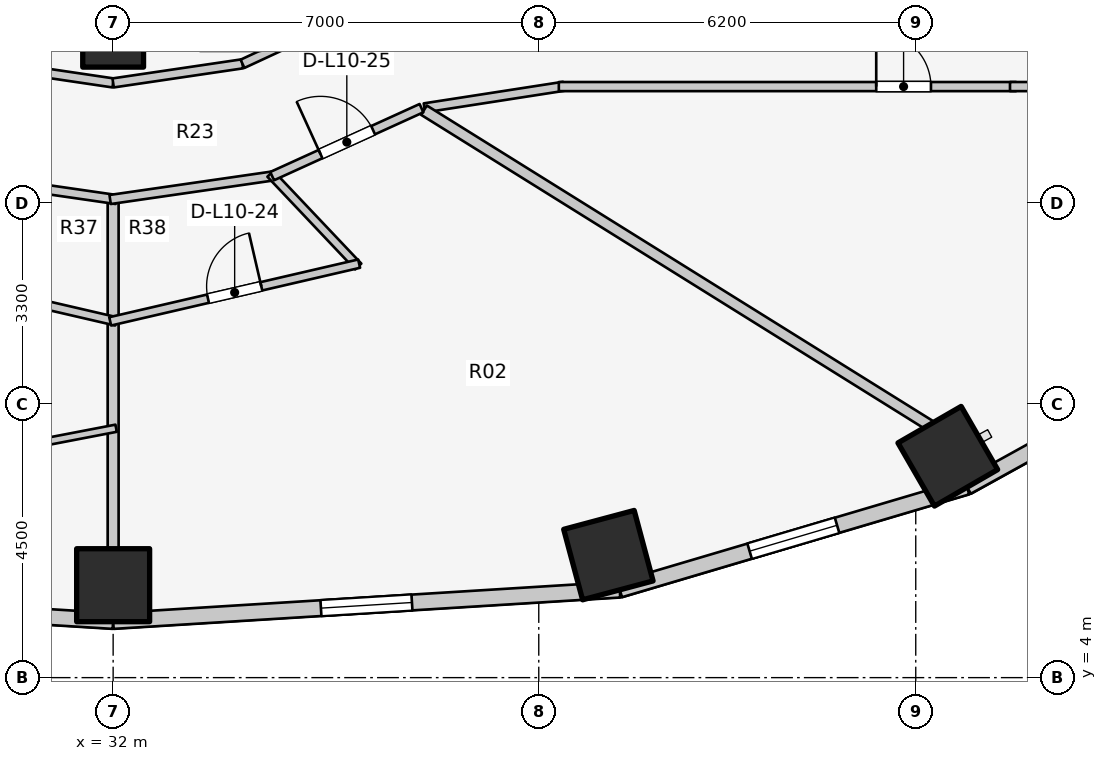
"""IFC4 building model, lengths in metres.
Left out: names, types, materials, properties, quantities, classifications, styles, units other than length and angle.
Written with IfcOpenShell. Run it as: python <this file> out.ifc"""

import sys

from ifc_helpers import new_model, si_unit, direction, frame, frame_2d, origin, origin_2d, place, context, subcontext, project, spatial, rectangle, extrude, element, fill, save


model = new_model("IFC4")
c1 = context("Model", 3, precision=1e-05, world=origin(), true_north=direction((0.0, 1.0)))
c2 = subcontext(c1, "Body", "Model", "MODEL_VIEW")
j1 = project(units=[si_unit("LENGTHUNIT", "METRE"), si_unit("PLANEANGLEUNIT", "RADIAN")], contexts=[c1])
p1 = place(None, origin())
s1 = spatial("IfcSite", under=j1, at=p1, CompositionType="ELEMENT")
p2 = place(p1, origin())
s2 = spatial("IfcBuilding", under=s1, at=p2, CompositionType="ELEMENT")
p3 = place(p2, frame((0.0, 0.0, 36.9)))
s3 = spatial("IfcBuildingStorey", under=s2, at=p3, CompositionType="ELEMENT", Elevation=36.9)
p4 = place(p3, frame((32.0, 14.54, 0.0), z_axis=(0.0, 0.0, 1.0), x_axis=(1.0, 0.0, 0.0)))
e1 = element("IfcColumn", 1, at=p4, inside=s3, PredefinedType="COLUMN", context=c2, shape_type="SweptSolid", body=[
    extrude(rectangle(XDim=1.0, YDim=1.0, at=origin_2d()), origin(), (0.0, 0.0, 1.0), 3.1),
])
for number, where, z_axis, x_axis in (
    (2, (32.0, 5.52, 0.0), (0.0, 0.0, 1.0), (0.0, -1.0, 0.0)),
    (3, (40.145, 6.014, 0.0), (0.0, 0.0, 1.0), (0.259, -0.966, 0.0)),
    (4, (45.727, 7.641, 0.0), (0.0, 0.0, 1.0), (0.5, -0.866, 0.0)),
):
    element("IfcColumn", number, at=place(p3, frame(where, z_axis=z_axis, x_axis=x_axis)), inside=s3, PredefinedType="COLUMN", context=c2, shape_type="SweptSolid", body=[
        extrude(rectangle(XDim=1.2, YDim=1.2, at=origin_2d()), origin(), (0.0, 0.0, 1.0), 3.1),
    ])
p5 = place(p3, frame((23.668, 5.447, 0.0), z_axis=(0.0, 0.0, 1.0), x_axis=(0.998090514779, -0.061768311519, 0.0)))
e5 = element("IfcWall", 5, at=p5, inside=s3, PredefinedType="STANDARD", context=c2, shape_type="SweptSolid", body=[
    extrude(rectangle(XDim=8.348, YDim=0.26, at=frame_2d((4.174, 0.0))), origin(), (0.0, 0.0, 1.0), 2.85),
])
p6 = place(p5, frame((2.974, 0.0, 0.75)))
e6 = element("IfcOpeningElement", 6, at=p6, cuts=e5, PredefinedType="OPENING", context=c2, shape_type="SweptSolid", body=[
    extrude(rectangle(XDim=2.4, YDim=1.7, at=frame_2d((1.2, 0.85))), frame((0.0, 0.14, 0.0), z_axis=(0.0, -1.0, 0.0), x_axis=(1.0, 0.0, 0.0)), (0.0, 0.0, 1.0), 0.28),
])
p7 = place(p3, frame((32.0, 4.931, 0.0), z_axis=(0.0, 0.0, 1.0), x_axis=(0.998090514779, 0.061768311519, 0.0)))
e7 = element("IfcWall", 7, at=p7, inside=s3, PredefinedType="STANDARD", context=c2, shape_type="SweptSolid", body=[
    extrude(rectangle(XDim=8.348, YDim=0.26, at=frame_2d((4.174, 0.0))), origin(), (0.0, 0.0, 1.0), 2.85),
])
p8 = place(p7, frame((3.424, 0.0, 0.75)))
e8 = element("IfcOpeningElement", 8, at=p8, cuts=e7, PredefinedType="OPENING", context=c2, shape_type="SweptSolid", body=[
    extrude(rectangle(XDim=1.5, YDim=1.6, at=frame_2d((0.75, 0.8))), frame((0.0, 0.14, 0.0), z_axis=(0.0, -1.0, 0.0), x_axis=(1.0, 0.0, 0.0)), (0.0, 0.0, 1.0), 0.28),
])
p9 = place(p3, frame((40.332, 5.447, 0.0), z_axis=(0.0, 0.0, 1.0), x_axis=(0.958843593522, 0.283934786811, 0.0)))
e9 = element("IfcWall", 9, at=p9, inside=s3, PredefinedType="STANDARD", context=c2, shape_type="SweptSolid", body=[
    extrude(rectangle(XDim=5.955, YDim=0.26, at=frame_2d((2.978, 0.0))), origin(), (0.0, 0.0, 1.0), 2.85),
])
p10 = place(p9, frame((2.228, 0.0, 0.75)))
e10 = element("IfcOpeningElement", 10, at=p10, cuts=e9, PredefinedType="OPENING", context=c2, shape_type="SweptSolid", body=[
    extrude(rectangle(XDim=1.5, YDim=1.6, at=frame_2d((0.75, 0.8))), frame((0.0, 0.14, 0.0), z_axis=(0.0, -1.0, 0.0), x_axis=(1.0, 0.0, 0.0)), (0.0, 0.0, 1.0), 0.28),
])
p11 = place(p3, frame((46.042, 7.138, 0.0), z_axis=(0.0, 0.0, 1.0), x_axis=(0.875137303239, 0.483874674352, 0.0)))
e11 = element("IfcWall", 11, at=p11, inside=s3, PredefinedType="STANDARD", context=c2, shape_type="SweptSolid", body=[
    extrude(rectangle(XDim=4.985, YDim=0.26, at=frame_2d((2.493, 0.0))), origin(), (0.0, 0.0, 1.0), 2.85),
])
for number, where, z_axis, x_axis in (
    (12, (29.873, 14.094, 0.0), (0.0, 0.0, 1.0), (0.989, -0.146, 0.0)),
    (13, (32.0, 13.78, 0.0), (0.0, 0.0, 1.0), (0.989, 0.146, 0.0)),
):
    element("IfcWall", number, at=place(p3, frame(where, z_axis=z_axis, x_axis=x_axis)), inside=s3, PredefinedType="PARTITIONING", context=c2, shape_type="SweptSolid", body=[
        extrude(rectangle(XDim=2.151, YDim=0.15, at=frame_2d((1.075, 0.0))), origin(), (0.0, 0.0, 1.0), 2.237),
    ])
p12 = place(p3, frame((34.127, 14.094, 0.0), z_axis=(0.0, 0.0, 1.0), x_axis=(0.906943449489, 0.421252393975, 0.0)))
e14 = element("IfcWall", 14, at=p12, inside=s3, PredefinedType="PARTITIONING", context=c2, shape_type="SweptSolid", body=[
    extrude(rectangle(XDim=2.186, YDim=0.15, at=frame_2d((1.093, 0.0))), origin(), (0.0, 0.0, 1.0), 2.237),
])
p13 = place(p3, frame((37.119, 13.369, 0.0), z_axis=(0.0, 0.0, 1.0), x_axis=(0.988184633586, 0.153268163508, 0.0)))
e15 = element("IfcWall", 15, at=p13, inside=s3, PredefinedType="PARTITIONING", context=c2, shape_type="SweptSolid", body=[
    extrude(rectangle(XDim=2.318, YDim=0.15, at=frame_2d((1.159, 0.0))), origin(), (0.0, 0.0, 1.0), 2.237),
])
p14 = place(p3, frame((39.33, 13.72, 0.0), z_axis=(0.0, 0.0, 1.0), x_axis=(1.0, 0.0, 0.0)))
e16 = element("IfcWall", 16, at=p14, inside=s3, PredefinedType="PARTITIONING", context=c2, shape_type="SweptSolid", body=[
    extrude(rectangle(XDim=7.52, YDim=0.15, at=frame_2d((3.76, 0.0))), origin(), (0.0, 0.0, 1.0), 2.237),
])
p15 = place(p14, frame((5.22, 0.0, 0.0)))
e17 = element("IfcOpeningElement", 17, at=p15, cuts=e16, PredefinedType="OPENING", context=c2, shape_type="SweptSolid", body=[
    extrude(rectangle(XDim=0.9, YDim=2.1, at=frame_2d((0.45, 1.05))), frame((0.0, 0.085, 0.0), z_axis=(0.0, -1.0, 0.0), x_axis=(1.0, 0.0, 0.0)), (0.0, 0.0, 1.0), 0.17),
])
p16 = place(p3, frame((46.75, 13.72, 0.0), z_axis=(0.0, 0.0, 1.0), x_axis=(1.0, 0.0, 0.0)))
e18 = element("IfcWall", 18, at=p16, inside=s3, PredefinedType="PARTITIONING", context=c2, shape_type="SweptSolid", body=[
    extrude(rectangle(XDim=5.05, YDim=0.15, at=frame_2d((2.525, 0.0))), origin(), (0.0, 0.0, 1.0), 2.069),
])
p17 = place(p3, frame((32.0, 11.815, 0.0), z_axis=(0.0, 0.0, 1.0), x_axis=(0.0, -1.0, 0.0)))
e19 = element("IfcWall", 19, at=p17, inside=s3, PredefinedType="PARTITIONING", context=c2, shape_type="SweptSolid", body=[
    extrude(rectangle(XDim=5.715, YDim=0.18, at=frame_2d((2.857, 0.0))), origin(), (0.0, 0.0, 1.0), 2.237),
])
p18 = place(p3, frame((37.112, 13.332, 0.0), z_axis=(0.0, 0.0, 1.0), x_axis=(0.848647785721, -0.52895834977, 0.0)))
e20 = element("IfcWall", 20, at=p18, inside=s3, PredefinedType="PARTITIONING", context=c2, shape_type="SweptSolid", body=[
    extrude(rectangle(XDim=9.81, YDim=0.18, at=frame_2d((4.905, 0.0))), origin(), (0.0, 0.0, 1.0), 2.237),
])
p19 = place(p3, frame((26.932, 7.118, 0.0), z_axis=(0.0, 0.0, 1.0), x_axis=(0.982039182538, 0.188677089126, 0.0)))
e21 = element("IfcWall", 21, at=p19, inside=s3, PredefinedType="MOVABLE", context=c2, shape_type="SweptSolid", body=[
    extrude(rectangle(XDim=5.211, YDim=0.12, at=frame_2d((2.605, 0.0))), origin(), (0.0, 0.0, 1.0), 2.237),
])
p20 = place(p19, frame((2.131, 0.0, 0.0)))
e22 = element("IfcOpeningElement", 22, at=p20, cuts=e21, PredefinedType="OPENING", context=c2, shape_type="SweptSolid", body=[
    extrude(rectangle(XDim=0.95, YDim=2.1, at=frame_2d((0.475, 1.05))), frame((0.0, 0.07, 0.0), z_axis=(0.0, -1.0, 0.0), x_axis=(1.0, 0.0, 0.0)), (0.0, 0.0, 1.0), 0.14),
])
p21 = place(p3, frame((29.329, 12.256, 0.0), z_axis=(0.0, 0.0, 1.0), x_axis=(0.989701115085, -0.143149232617, 0.0)))
e23 = element("IfcWall", 23, at=p21, inside=s3, PredefinedType="PARTITIONING", context=c2, shape_type="SweptSolid", body=[
    extrude(rectangle(XDim=2.749, YDim=0.15, at=frame_2d((1.375, 0.0))), origin(), (0.0, 0.0, 1.0), 2.237),
])
p22 = place(p3, frame((27.954, 10.808, 0.0), z_axis=(0.0, 0.0, 1.0), x_axis=(0.974148813221, -0.225907259071, 0.0)))
e24 = element("IfcWall", 24, at=p22, inside=s3, PredefinedType="PLUMBINGWALL", context=c2, shape_type="SweptSolid", body=[
    extrude(rectangle(XDim=4.203, YDim=0.14, at=frame_2d((2.102, 0.0))), origin(), (0.0, 0.0, 1.0), 2.237),
])
p23 = place(p22, frame((1.652, 0.0, 0.0)))
e25 = element("IfcOpeningElement", 25, at=p23, cuts=e24, PredefinedType="OPENING", context=c2, shape_type="SweptSolid", body=[
    extrude(rectangle(XDim=0.9, YDim=2.1, at=frame_2d((0.45, 1.05))), frame((0.0, 0.08, 0.0), z_axis=(0.0, -1.0, 0.0), x_axis=(1.0, 0.0, 0.0)), (0.0, 0.0, 1.0), 0.16),
])
p24 = place(p3, frame((31.95, 11.863, 0.0), z_axis=(0.0, 0.0, 1.0), x_axis=(0.989701115085, 0.143149232617, 0.0)))
e26 = element("IfcWall", 26, at=p24, inside=s3, PredefinedType="PARTITIONING", context=c2, shape_type="SweptSolid", body=[
    extrude(rectangle(XDim=2.749, YDim=0.15, at=frame_2d((1.375, 0.0))), origin(), (0.0, 0.0, 1.0), 2.237),
])
p25 = place(p3, frame((34.587, 12.285, 0.0), z_axis=(0.0, 0.0, 1.0), x_axis=(0.687544693502, -0.72614206216, 0.0)))
e27 = element("IfcWall", 27, at=p25, inside=s3, PredefinedType="PLUMBINGWALL", context=c2, shape_type="SweptSolid", body=[
    extrude(rectangle(XDim=2.1, YDim=0.14, at=frame_2d((1.05, 0.0))), origin(), (0.0, 0.0, 1.0), 2.855),
])
p26 = place(p3, frame((31.951, 9.859, 0.0), z_axis=(0.0, 0.0, 1.0), x_axis=(0.974148813221, 0.225907259071, 0.0)))
e28 = element("IfcWall", 28, at=p26, inside=s3, PredefinedType="PLUMBINGWALL", context=c2, shape_type="SweptSolid", body=[
    extrude(rectangle(XDim=4.203, YDim=0.14, at=frame_2d((2.102, 0.0))), origin(), (0.0, 0.0, 1.0), 2.237),
])
p27 = place(p26, frame((1.652, 0.0, 0.0)))
e29 = element("IfcOpeningElement", 29, at=p27, cuts=e28, PredefinedType="OPENING", context=c2, shape_type="SweptSolid", body=[
    extrude(rectangle(XDim=0.9, YDim=2.1, at=frame_2d((0.45, 1.05))), frame((0.0, 0.08, 0.0), z_axis=(0.0, -1.0, 0.0), x_axis=(1.0, 0.0, 0.0)), (0.0, 0.0, 1.0), 0.16),
])
p28 = place(p3, frame((34.615, 12.247, 0.0), z_axis=(0.0, 0.0, 1.0), x_axis=(0.910186679378, 0.414198272186, 0.0)))
e30 = element("IfcWall", 30, at=p28, inside=s3, PredefinedType="PARTITIONING", context=c2, shape_type="SweptSolid", body=[
    extrude(rectangle(XDim=2.698, YDim=0.15, at=frame_2d((1.349, 0.0))), origin(), (0.0, 0.0, 1.0), 2.237),
])
p29 = place(p28, frame((0.874, 0.0, 0.0)))
e31 = element("IfcOpeningElement", 31, at=p29, cuts=e30, PredefinedType="OPENING", context=c2, shape_type="SweptSolid", body=[
    extrude(rectangle(XDim=0.95, YDim=2.1, at=frame_2d((0.475, 1.05))), frame((0.0, 0.085, 0.0), z_axis=(0.0, -1.0, 0.0), x_axis=(1.0, 0.0, 0.0)), (0.0, 0.0, 1.0), 0.17),
])
p30 = place(p8, origin())
e32 = element("IfcWindow", 32, at=p30, inside=s3, PartitioningType="SINGLE_PANEL", PredefinedType="WINDOW", context=c2, shape_type="SweptSolid", body=[
    extrude(rectangle(XDim=1.5, YDim=1.6, at=frame_2d((0.75, 0.8))), frame((0.0, 0.03, 0.0), z_axis=(0.0, -1.0, 0.0), x_axis=(1.0, 0.0, 0.0)), (0.0, 0.0, 1.0), 0.06),
])
fill(e8, e32)
p31 = place(p10, origin())
e33 = element("IfcWindow", 33, at=p31, inside=s3, PartitioningType="SINGLE_PANEL", PredefinedType="WINDOW", context=c2, shape_type="SweptSolid", body=[
    extrude(rectangle(XDim=1.5, YDim=1.6, at=frame_2d((0.75, 0.8))), frame((0.0, 0.03, 0.0), z_axis=(0.0, -1.0, 0.0), x_axis=(1.0, 0.0, 0.0)), (0.0, 0.0, 1.0), 0.06),
])
fill(e10, e33)
p32 = place(p15, origin())
e34 = element("IfcDoor", 34, at=p32, inside=s3, OperationType="SINGLE_SWING_LEFT", PredefinedType="DOOR", context=c2, shape_type="SweptSolid", body=[
    extrude(rectangle(XDim=0.9, YDim=2.1, at=frame_2d((0.45, 1.05))), frame((0.0, 0.025, 0.0), z_axis=(0.0, -1.0, 0.0), x_axis=(1.0, 0.0, 0.0)), (0.0, 0.0, 1.0), 0.05),
])
fill(e17, e34)
p33 = place(p27, origin())
e35 = element("IfcDoor", 35, at=p33, inside=s3, OperationType="SINGLE_SWING_RIGHT", PredefinedType="DOOR", context=c2, shape_type="SweptSolid", body=[
    extrude(rectangle(XDim=0.9, YDim=2.1, at=frame_2d((0.45, 1.05))), frame((0.0, 0.025, 0.0), z_axis=(0.0, -1.0, 0.0), x_axis=(1.0, 0.0, 0.0)), (0.0, 0.0, 1.0), 0.05),
])
fill(e29, e35)
p34 = place(p29, origin())
e36 = element("IfcDoor", 36, at=p34, inside=s3, OperationType="SINGLE_SWING_LEFT", PredefinedType="DOOR", context=c2, shape_type="SweptSolid", body=[
    extrude(rectangle(XDim=0.95, YDim=2.1, at=frame_2d((0.475, 1.05))), frame((0.0, 0.025, 0.0), z_axis=(0.0, -1.0, 0.0), x_axis=(1.0, 0.0, 0.0)), (0.0, 0.0, 1.0), 0.05),
])
fill(e31, e36)
save(model, sys.argv[1])
